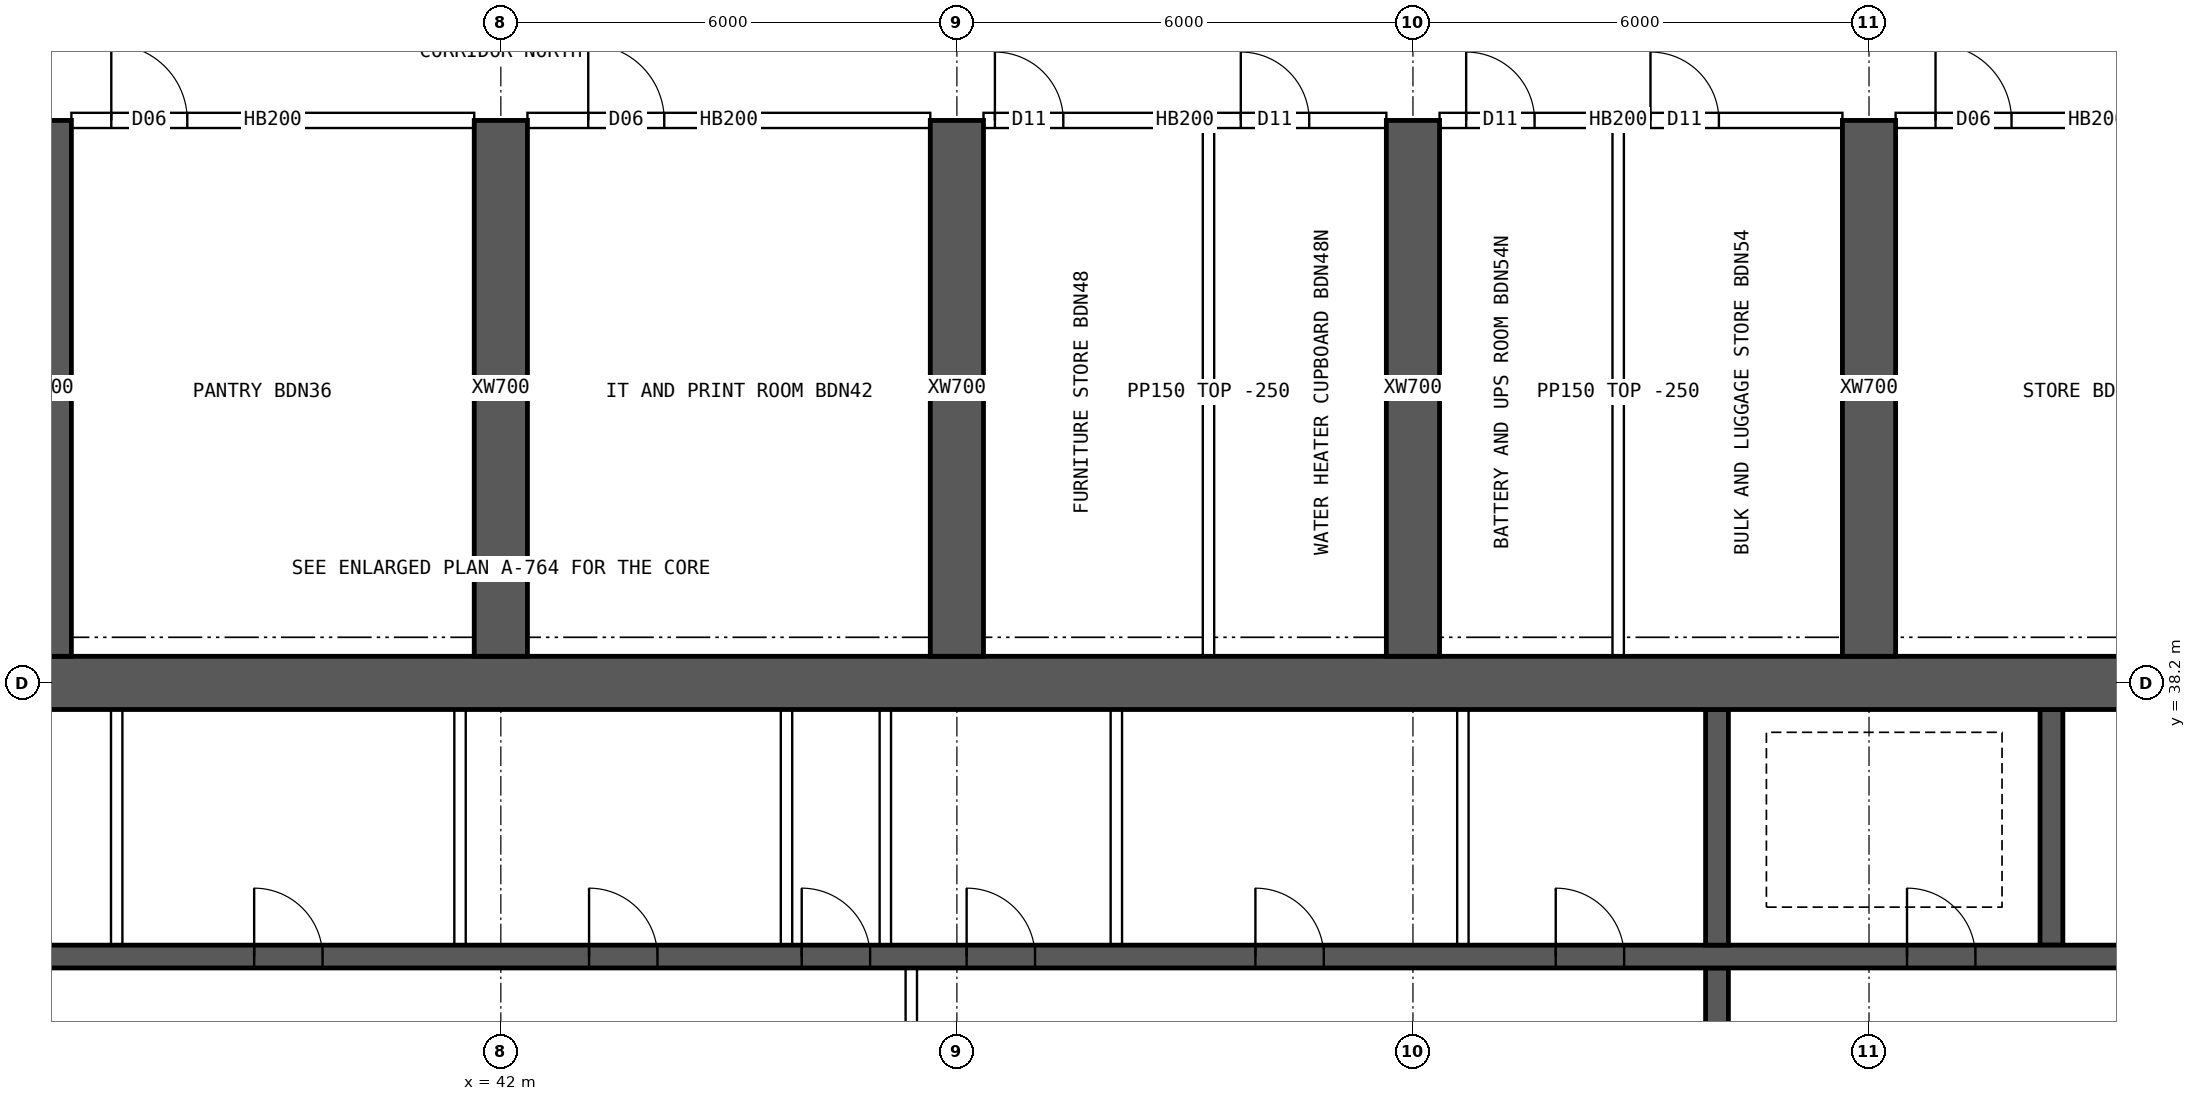
"""IFC4 building model, lengths in metres.
Left out: names, types, materials, properties, quantities, classifications, styles, units other than length and angle.
Written with IfcOpenShell. Run it as: python <this file> out.ifc"""

import sys

from ifc_helpers import new_model, si_unit, direction, frame, frame_2d, origin, place, context, subcontext, project, spatial, rectangle, extrude, element, fill, save


model = new_model("IFC4")
c1 = context("Model", 3, precision=1e-05, world=origin(), true_north=direction((0.0, 1.0)))
c2 = subcontext(c1, "Body", "Model", "MODEL_VIEW")
j1 = project(units=[si_unit("LENGTHUNIT", "METRE"), si_unit("PLANEANGLEUNIT", "RADIAN")], contexts=[c1])
p1 = place(None, origin())
s1 = spatial("IfcSite", under=j1, at=p1, CompositionType="ELEMENT")
p2 = place(p1, origin())
s2 = spatial("IfcBuilding", under=s1, at=p2, CompositionType="ELEMENT")
p3 = place(p2, frame((0.0, 0.0, 246.55)))
s3 = spatial("IfcBuildingStorey", under=s2, at=p3, CompositionType="ELEMENT", Elevation=246.55)
p4 = place(p3, frame((18.0, 38.2, 0.0), z_axis=(0.0, 0.0, 1.0), x_axis=(1.0, 0.0, 0.0)))
e1 = element("IfcWall", 1, at=p4, inside=s3, PredefinedType="SHEAR", context=c2, shape_type="SweptSolid", body=[
    extrude(rectangle(XDim=48.0, YDim=0.7, at=frame_2d((24.0, 0.0))), origin(), (0.0, 0.0, 1.0), 3.75),
])
p5 = place(p3, frame((18.35, 34.6, 0.0), z_axis=(0.0, 0.0, 1.0), x_axis=(1.0, 0.0, 0.0)))
e2 = element("IfcWall", 2, at=p5, inside=s3, PredefinedType="SHEAR", context=c2, shape_type="SweptSolid", body=[
    extrude(rectangle(XDim=47.3, YDim=0.3, at=frame_2d((23.65, 0.0))), origin(), (0.0, 0.0, 1.0), 3.75),
])
p6 = place(p5, frame((0.9, 0.0, 0.0)))
e3 = element("IfcOpeningElement", 3, at=p6, cuts=e2, PredefinedType="OPENING", context=c2, shape_type="SweptSolid", body=[
    extrude(rectangle(XDim=1.1, YDim=2.1, at=frame_2d((0.55, 1.05))), frame((0.0, 0.16, 0.0), z_axis=(0.0, -1.0, 0.0), x_axis=(1.0, 0.0, 0.0)), (0.0, 0.0, 1.0), 0.32),
])
p7 = place(p5, frame((45.3, 0.0, 0.0)))
e4 = element("IfcOpeningElement", 4, at=p7, cuts=e2, PredefinedType="OPENING", context=c2, shape_type="SweptSolid", body=[
    extrude(rectangle(XDim=1.1, YDim=2.1, at=frame_2d((0.55, 1.05))), frame((0.0, 0.16, 0.0), z_axis=(0.0, -1.0, 0.0), x_axis=(1.0, 0.0, 0.0)), (0.0, 0.0, 1.0), 0.32),
])
p8 = place(p5, frame((4.25, 0.0, 0.0)))
e5 = element("IfcOpeningElement", 5, at=p8, cuts=e2, PredefinedType="OPENING", context=c2, shape_type="SweptSolid", body=[
    extrude(rectangle(XDim=0.9, YDim=2.1, at=frame_2d((0.45, 1.05))), frame((0.0, 0.16, 0.0), z_axis=(0.0, -1.0, 0.0), x_axis=(1.0, 0.0, 0.0)), (0.0, 0.0, 1.0), 0.32),
])
p9 = place(p5, frame((42.15, 0.0, 0.0)))
e6 = element("IfcOpeningElement", 6, at=p9, cuts=e2, PredefinedType="OPENING", context=c2, shape_type="SweptSolid", body=[
    extrude(rectangle(XDim=0.9, YDim=2.1, at=frame_2d((0.45, 1.05))), frame((0.0, 0.16, 0.0), z_axis=(0.0, -1.0, 0.0), x_axis=(1.0, 0.0, 0.0)), (0.0, 0.0, 1.0), 0.32),
])
p10 = place(p5, frame((9.025, 0.0, 0.0)))
e7 = element("IfcOpeningElement", 7, at=p10, cuts=e2, PredefinedType="OPENING", context=c2, shape_type="SweptSolid", body=[
    extrude(rectangle(XDim=0.9, YDim=2.1, at=frame_2d((0.45, 1.05))), frame((0.0, 0.16, 0.0), z_axis=(0.0, -1.0, 0.0), x_axis=(1.0, 0.0, 0.0)), (0.0, 0.0, 1.0), 0.32),
])
p11 = place(p5, frame((12.999, 0.0, 0.0)))
e8 = element("IfcOpeningElement", 8, at=p11, cuts=e2, PredefinedType="OPENING", context=c2, shape_type="SweptSolid", body=[
    extrude(rectangle(XDim=0.9, YDim=2.1, at=frame_2d((0.45, 1.05))), frame((0.0, 0.16, 0.0), z_axis=(0.0, -1.0, 0.0), x_axis=(1.0, 0.0, 0.0)), (0.0, 0.0, 1.0), 0.32),
])
p12 = place(p5, frame((16.646, 0.0, 0.0)))
e9 = element("IfcOpeningElement", 9, at=p12, cuts=e2, PredefinedType="OPENING", context=c2, shape_type="SweptSolid", body=[
    extrude(rectangle(XDim=0.9, YDim=2.1, at=frame_2d((0.45, 1.05))), frame((0.0, 0.16, 0.0), z_axis=(0.0, -1.0, 0.0), x_axis=(1.0, 0.0, 0.0)), (0.0, 0.0, 1.0), 0.32),
])
p13 = place(p5, frame((20.405, 0.0, 0.0)))
e10 = element("IfcOpeningElement", 10, at=p13, cuts=e2, PredefinedType="OPENING", context=c2, shape_type="SweptSolid", body=[
    extrude(rectangle(XDim=0.9, YDim=2.1, at=frame_2d((0.45, 1.05))), frame((0.0, 0.16, 0.0), z_axis=(0.0, -1.0, 0.0), x_axis=(1.0, 0.0, 0.0)), (0.0, 0.0, 1.0), 0.32),
])
p14 = place(p5, frame((24.811, 0.0, 0.0)))
e11 = element("IfcOpeningElement", 11, at=p14, cuts=e2, PredefinedType="OPENING", context=c2, shape_type="SweptSolid", body=[
    extrude(rectangle(XDim=0.9, YDim=2.1, at=frame_2d((0.45, 1.05))), frame((0.0, 0.16, 0.0), z_axis=(0.0, -1.0, 0.0), x_axis=(1.0, 0.0, 0.0)), (0.0, 0.0, 1.0), 0.32),
])
p15 = place(p5, frame((27.608, 0.0, 0.0)))
e12 = element("IfcOpeningElement", 12, at=p15, cuts=e2, PredefinedType="OPENING", context=c2, shape_type="SweptSolid", body=[
    extrude(rectangle(XDim=0.9, YDim=2.1, at=frame_2d((0.45, 1.05))), frame((0.0, 0.16, 0.0), z_axis=(0.0, -1.0, 0.0), x_axis=(1.0, 0.0, 0.0)), (0.0, 0.0, 1.0), 0.32),
])
p16 = place(p5, frame((29.778, 0.0, 0.0)))
e13 = element("IfcOpeningElement", 13, at=p16, cuts=e2, PredefinedType="OPENING", context=c2, shape_type="SweptSolid", body=[
    extrude(rectangle(XDim=0.9, YDim=2.1, at=frame_2d((0.45, 1.05))), frame((0.0, 0.16, 0.0), z_axis=(0.0, -1.0, 0.0), x_axis=(1.0, 0.0, 0.0)), (0.0, 0.0, 1.0), 0.32),
])
p17 = place(p5, frame((33.577, 0.0, 0.0)))
e14 = element("IfcOpeningElement", 14, at=p17, cuts=e2, PredefinedType="OPENING", context=c2, shape_type="SweptSolid", body=[
    extrude(rectangle(XDim=0.9, YDim=2.1, at=frame_2d((0.45, 1.05))), frame((0.0, 0.16, 0.0), z_axis=(0.0, -1.0, 0.0), x_axis=(1.0, 0.0, 0.0)), (0.0, 0.0, 1.0), 0.32),
])
p18 = place(p5, frame((37.528, 0.0, 0.0)))
e15 = element("IfcOpeningElement", 15, at=p18, cuts=e2, PredefinedType="OPENING", context=c2, shape_type="SweptSolid", body=[
    extrude(rectangle(XDim=0.9, YDim=2.1, at=frame_2d((0.45, 1.05))), frame((0.0, 0.16, 0.0), z_axis=(0.0, -1.0, 0.0), x_axis=(1.0, 0.0, 0.0)), (0.0, 0.0, 1.0), 0.32),
])
p19 = place(p3, frame((58.0, 30.55, 0.0), z_axis=(0.0, 0.0, 1.0), x_axis=(0.0, 1.0, 0.0)))
e16 = element("IfcWall", 16, at=p19, inside=s3, PredefinedType="SHEAR", context=c2, shape_type="SweptSolid", body=[
    extrude(rectangle(XDim=3.9, YDim=0.3, at=frame_2d((1.95, 0.0))), origin(), (0.0, 0.0, 1.0), 3.75),
])
p20 = place(p19, frame((1.4, 0.0, 0.0)))
e17 = element("IfcOpeningElement", 17, at=p20, cuts=e16, PredefinedType="OPENING", context=c2, shape_type="SweptSolid", body=[
    extrude(rectangle(XDim=1.2, YDim=2.1, at=frame_2d((0.6, 1.05))), frame((0.0, 0.16, 0.0), z_axis=(0.0, -1.0, 0.0), x_axis=(1.0, 0.0, 0.0)), (0.0, 0.0, 1.0), 0.32),
])
for number, where, z_axis, x_axis in (
    (18, (62.4, 34.75, 0.0), (0.0, 0.0, 1.0), (0.0, 1.0, 0.0)),
    (19, (58.0, 34.75, 0.0), (0.0, 0.0, 1.0), (0.0, 1.0, 0.0)),
):
    element("IfcWall", number, at=place(p3, frame(where, z_axis=z_axis, x_axis=x_axis)), inside=s3, PredefinedType="SHEAR", context=c2, shape_type="SweptSolid", body=[
        extrude(rectangle(XDim=3.1, YDim=0.3, at=frame_2d((1.55, 0.0))), origin(), (0.0, 0.0, 1.0), 3.75),
    ])
for number, where, z_axis, x_axis in (
    (20, (36.0, 38.55, 0.0), (0.0, 0.0, 1.0), (0.0, 1.0, 0.0)),
    (21, (42.0, 38.55, 0.0), (0.0, 0.0, 1.0), (0.0, 1.0, 0.0)),
    (22, (48.0, 38.55, 0.0), (0.0, 0.0, 1.0), (0.0, 1.0, 0.0)),
    (23, (54.0, 38.55, 0.0), (0.0, 0.0, 1.0), (0.0, 1.0, 0.0)),
    (24, (60.0, 38.55, 0.0), (0.0, 0.0, 1.0), (0.0, 1.0, 0.0)),
):
    element("IfcWall", number, at=place(p3, frame(where, z_axis=z_axis, x_axis=x_axis)), inside=s3, PredefinedType="SHEAR", context=c2, shape_type="SweptSolid", body=[
        extrude(rectangle(XDim=7.05, YDim=0.7, at=frame_2d((3.525, 0.0))), origin(), (0.0, 0.0, 1.0), 3.75),
    ])
p21 = place(p3, frame((47.4, 30.55, 0.0), z_axis=(0.0, 0.0, 1.0), x_axis=(0.0, 1.0, 0.0)))
e25 = element("IfcWall", 25, at=p21, inside=s3, PredefinedType="SOLIDWALL", context=c2, shape_type="SweptSolid", body=[
    extrude(rectangle(XDim=3.9, YDim=0.15, at=frame_2d((1.95, 0.0))), origin(), (0.0, 0.0, 1.0), 3.5),
])
p22 = place(p21, frame((1.15, 0.0, 0.0)))
e26 = element("IfcOpeningElement", 26, at=p22, cuts=e25, PredefinedType="OPENING", context=c2, shape_type="SweptSolid", body=[
    extrude(rectangle(XDim=1.6, YDim=2.1, at=frame_2d((0.8, 1.05))), frame((0.0, 0.085, 0.0), z_axis=(0.0, -1.0, 0.0), x_axis=(1.0, 0.0, 0.0)), (0.0, 0.0, 1.0), 0.17),
])
for number, where, z_axis, x_axis in (
    (27, (36.946, 34.75, 0.0), (0.0, 0.0, 1.0), (0.0, 1.0, 0.0)),
    (28, (41.463, 34.75, 0.0), (0.0, 0.0, 1.0), (0.0, 1.0, 0.0)),
    (29, (45.758, 34.75, 0.0), (0.0, 0.0, 1.0), (0.0, 1.0, 0.0)),
    (30, (47.058, 34.75, 0.0), (0.0, 0.0, 1.0), (0.0, 1.0, 0.0)),
    (31, (50.098, 34.75, 0.0), (0.0, 0.0, 1.0), (0.0, 1.0, 0.0)),
    (32, (54.657, 34.75, 0.0), (0.0, 0.0, 1.0), (0.0, 1.0, 0.0)),
):
    element("IfcWall", number, at=place(p3, frame(where, z_axis=z_axis, x_axis=x_axis)), inside=s3, PredefinedType="SOLIDWALL", context=c2, shape_type="SweptSolid", body=[
        extrude(rectangle(XDim=3.1, YDim=0.15, at=frame_2d((1.55, 0.0))), origin(), (0.0, 0.0, 1.0), 3.5),
    ])
p23 = place(p3, frame((36.35, 45.6, 0.0), z_axis=(0.0, 0.0, 1.0), x_axis=(1.0, 0.0, 0.0)))
e33 = element("IfcWall", 33, at=p23, inside=s3, PredefinedType="SOLIDWALL", context=c2, shape_type="SweptSolid", body=[
    extrude(rectangle(XDim=5.3, YDim=0.2, at=frame_2d((2.65, 0.0))), origin(), (0.0, 0.0, 1.0), 3.5),
])
p24 = place(p23, frame((0.525, 0.0, 0.0)))
e34 = element("IfcOpeningElement", 34, at=p24, cuts=e33, PredefinedType="OPENING", context=c2, shape_type="SweptSolid", body=[
    extrude(rectangle(XDim=1.0, YDim=2.1, at=frame_2d((0.5, 1.05))), frame((0.0, 0.11, 0.0), z_axis=(0.0, -1.0, 0.0), x_axis=(1.0, 0.0, 0.0)), (0.0, 0.0, 1.0), 0.22),
])
p25 = place(p3, frame((42.35, 45.6, 0.0), z_axis=(0.0, 0.0, 1.0), x_axis=(1.0, 0.0, 0.0)))
e35 = element("IfcWall", 35, at=p25, inside=s3, PredefinedType="SOLIDWALL", context=c2, shape_type="SweptSolid", body=[
    extrude(rectangle(XDim=5.3, YDim=0.2, at=frame_2d((2.65, 0.0))), origin(), (0.0, 0.0, 1.0), 3.5),
])
p26 = place(p25, frame((0.8, 0.0, 0.0)))
e36 = element("IfcOpeningElement", 36, at=p26, cuts=e35, PredefinedType="OPENING", context=c2, shape_type="SweptSolid", body=[
    extrude(rectangle(XDim=1.0, YDim=2.1, at=frame_2d((0.5, 1.05))), frame((0.0, 0.11, 0.0), z_axis=(0.0, -1.0, 0.0), x_axis=(1.0, 0.0, 0.0)), (0.0, 0.0, 1.0), 0.22),
])
p27 = place(p3, frame((48.35, 45.6, 0.0), z_axis=(0.0, 0.0, 1.0), x_axis=(1.0, 0.0, 0.0)))
e37 = element("IfcWall", 37, at=p27, inside=s3, PredefinedType="SOLIDWALL", context=c2, shape_type="SweptSolid", body=[
    extrude(rectangle(XDim=5.3, YDim=0.2, at=frame_2d((2.65, 0.0))), origin(), (0.0, 0.0, 1.0), 3.5),
])
p28 = place(p27, frame((0.15, 0.0, 0.0)))
e38 = element("IfcOpeningElement", 38, at=p28, cuts=e37, PredefinedType="OPENING", context=c2, shape_type="SweptSolid", body=[
    extrude(rectangle(XDim=0.9, YDim=2.1, at=frame_2d((0.45, 1.05))), frame((0.0, 0.11, 0.0), z_axis=(0.0, -1.0, 0.0), x_axis=(1.0, 0.0, 0.0)), (0.0, 0.0, 1.0), 0.22),
])
p29 = place(p27, frame((3.385, 0.0, 0.0)))
e39 = element("IfcOpeningElement", 39, at=p29, cuts=e37, PredefinedType="OPENING", context=c2, shape_type="SweptSolid", body=[
    extrude(rectangle(XDim=0.9, YDim=2.1, at=frame_2d((0.45, 1.05))), frame((0.0, 0.11, 0.0), z_axis=(0.0, -1.0, 0.0), x_axis=(1.0, 0.0, 0.0)), (0.0, 0.0, 1.0), 0.22),
])
p30 = place(p3, frame((54.35, 45.6, 0.0), z_axis=(0.0, 0.0, 1.0), x_axis=(1.0, 0.0, 0.0)))
e40 = element("IfcWall", 40, at=p30, inside=s3, PredefinedType="SOLIDWALL", context=c2, shape_type="SweptSolid", body=[
    extrude(rectangle(XDim=5.3, YDim=0.2, at=frame_2d((2.65, 0.0))), origin(), (0.0, 0.0, 1.0), 3.5),
])
p31 = place(p30, frame((0.35, 0.0, 0.0)))
e41 = element("IfcOpeningElement", 41, at=p31, cuts=e40, PredefinedType="OPENING", context=c2, shape_type="SweptSolid", body=[
    extrude(rectangle(XDim=0.9, YDim=2.1, at=frame_2d((0.45, 1.05))), frame((0.0, 0.11, 0.0), z_axis=(0.0, -1.0, 0.0), x_axis=(1.0, 0.0, 0.0)), (0.0, 0.0, 1.0), 0.22),
])
p32 = place(p30, frame((2.775, 0.0, 0.0)))
e42 = element("IfcOpeningElement", 42, at=p32, cuts=e40, PredefinedType="OPENING", context=c2, shape_type="SweptSolid", body=[
    extrude(rectangle(XDim=0.9, YDim=2.1, at=frame_2d((0.45, 1.05))), frame((0.0, 0.11, 0.0), z_axis=(0.0, -1.0, 0.0), x_axis=(1.0, 0.0, 0.0)), (0.0, 0.0, 1.0), 0.22),
])
p33 = place(p3, frame((60.35, 45.6, 0.0), z_axis=(0.0, 0.0, 1.0), x_axis=(1.0, 0.0, 0.0)))
e43 = element("IfcWall", 43, at=p33, inside=s3, PredefinedType="SOLIDWALL", context=c2, shape_type="SweptSolid", body=[
    extrude(rectangle(XDim=5.3, YDim=0.2, at=frame_2d((2.65, 0.0))), origin(), (0.0, 0.0, 1.0), 3.5),
])
p34 = place(p33, frame((0.525, 0.0, 0.0)))
e44 = element("IfcOpeningElement", 44, at=p34, cuts=e43, PredefinedType="OPENING", context=c2, shape_type="SweptSolid", body=[
    extrude(rectangle(XDim=1.0, YDim=2.1, at=frame_2d((0.5, 1.05))), frame((0.0, 0.11, 0.0), z_axis=(0.0, -1.0, 0.0), x_axis=(1.0, 0.0, 0.0)), (0.0, 0.0, 1.0), 0.22),
])
for number, where, z_axis, x_axis in (
    (45, (51.31, 38.55, 0.0), (0.0, 0.0, 1.0), (0.0, 1.0, 0.0)),
    (46, (56.7, 38.55, 0.0), (0.0, 0.0, 1.0), (0.0, 1.0, 0.0)),
):
    element("IfcWall", number, at=place(p3, frame(where, z_axis=z_axis, x_axis=x_axis)), inside=s3, PredefinedType="PARTITIONING", context=c2, shape_type="SweptSolid", body=[
        extrude(rectangle(XDim=6.95, YDim=0.15, at=frame_2d((3.475, 0.0))), origin(), (0.0, 0.0, 1.0), 3.5),
    ])
p35 = place(p9, origin())
e47 = element("IfcDoor", 47, at=p35, inside=s3, OperationType="SINGLE_SWING_LEFT", PredefinedType="DOOR", context=c2, shape_type="SweptSolid", body=[
    extrude(rectangle(XDim=0.9, YDim=2.1, at=frame_2d((0.45, 1.05))), frame((0.0, 0.025, 0.0), z_axis=(0.0, -1.0, 0.0), x_axis=(1.0, 0.0, 0.0)), (0.0, 0.0, 1.0), 0.05),
])
fill(e6, e47)
p36 = place(p13, origin())
e48 = element("IfcDoor", 48, at=p36, inside=s3, OperationType="SINGLE_SWING_LEFT", PredefinedType="DOOR", context=c2, shape_type="SweptSolid", body=[
    extrude(rectangle(XDim=0.9, YDim=2.1, at=frame_2d((0.45, 1.05))), frame((0.0, 0.025, 0.0), z_axis=(0.0, -1.0, 0.0), x_axis=(1.0, 0.0, 0.0)), (0.0, 0.0, 1.0), 0.05),
])
fill(e10, e48)
p37 = place(p14, origin())
e49 = element("IfcDoor", 49, at=p37, inside=s3, OperationType="SINGLE_SWING_LEFT", PredefinedType="DOOR", context=c2, shape_type="SweptSolid", body=[
    extrude(rectangle(XDim=0.9, YDim=2.1, at=frame_2d((0.45, 1.05))), frame((0.0, 0.025, 0.0), z_axis=(0.0, -1.0, 0.0), x_axis=(1.0, 0.0, 0.0)), (0.0, 0.0, 1.0), 0.05),
])
fill(e11, e49)
p38 = place(p15, origin())
e50 = element("IfcDoor", 50, at=p38, inside=s3, OperationType="SINGLE_SWING_LEFT", PredefinedType="DOOR", context=c2, shape_type="SweptSolid", body=[
    extrude(rectangle(XDim=0.9, YDim=2.1, at=frame_2d((0.45, 1.05))), frame((0.0, 0.025, 0.0), z_axis=(0.0, -1.0, 0.0), x_axis=(1.0, 0.0, 0.0)), (0.0, 0.0, 1.0), 0.05),
])
fill(e12, e50)
p39 = place(p16, origin())
e51 = element("IfcDoor", 51, at=p39, inside=s3, OperationType="SINGLE_SWING_LEFT", PredefinedType="DOOR", context=c2, shape_type="SweptSolid", body=[
    extrude(rectangle(XDim=0.9, YDim=2.1, at=frame_2d((0.45, 1.05))), frame((0.0, 0.025, 0.0), z_axis=(0.0, -1.0, 0.0), x_axis=(1.0, 0.0, 0.0)), (0.0, 0.0, 1.0), 0.05),
])
fill(e13, e51)
p40 = place(p17, origin())
e52 = element("IfcDoor", 52, at=p40, inside=s3, OperationType="SINGLE_SWING_LEFT", PredefinedType="DOOR", context=c2, shape_type="SweptSolid", body=[
    extrude(rectangle(XDim=0.9, YDim=2.1, at=frame_2d((0.45, 1.05))), frame((0.0, 0.025, 0.0), z_axis=(0.0, -1.0, 0.0), x_axis=(1.0, 0.0, 0.0)), (0.0, 0.0, 1.0), 0.05),
])
fill(e14, e52)
p41 = place(p18, origin())
e53 = element("IfcDoor", 53, at=p41, inside=s3, OperationType="SINGLE_SWING_LEFT", PredefinedType="DOOR", context=c2, shape_type="SweptSolid", body=[
    extrude(rectangle(XDim=0.9, YDim=2.1, at=frame_2d((0.45, 1.05))), frame((0.0, 0.025, 0.0), z_axis=(0.0, -1.0, 0.0), x_axis=(1.0, 0.0, 0.0)), (0.0, 0.0, 1.0), 0.05),
])
fill(e15, e53)
p42 = place(p24, origin())
e54 = element("IfcDoor", 54, at=p42, inside=s3, OperationType="SINGLE_SWING_LEFT", PredefinedType="DOOR", context=c2, shape_type="SweptSolid", body=[
    extrude(rectangle(XDim=1.0, YDim=2.1, at=frame_2d((0.5, 1.05))), frame((0.0, 0.025, 0.0), z_axis=(0.0, -1.0, 0.0), x_axis=(1.0, 0.0, 0.0)), (0.0, 0.0, 1.0), 0.05),
])
fill(e34, e54)
p43 = place(p26, origin())
e55 = element("IfcDoor", 55, at=p43, inside=s3, OperationType="SINGLE_SWING_LEFT", PredefinedType="DOOR", context=c2, shape_type="SweptSolid", body=[
    extrude(rectangle(XDim=1.0, YDim=2.1, at=frame_2d((0.5, 1.05))), frame((0.0, 0.025, 0.0), z_axis=(0.0, -1.0, 0.0), x_axis=(1.0, 0.0, 0.0)), (0.0, 0.0, 1.0), 0.05),
])
fill(e36, e55)
p44 = place(p28, origin())
e56 = element("IfcDoor", 56, at=p44, inside=s3, OperationType="SINGLE_SWING_LEFT", PredefinedType="DOOR", context=c2, shape_type="SweptSolid", body=[
    extrude(rectangle(XDim=0.9, YDim=2.1, at=frame_2d((0.45, 1.05))), frame((0.0, 0.025, 0.0), z_axis=(0.0, -1.0, 0.0), x_axis=(1.0, 0.0, 0.0)), (0.0, 0.0, 1.0), 0.05),
])
fill(e38, e56)
p45 = place(p29, origin())
e57 = element("IfcDoor", 57, at=p45, inside=s3, OperationType="SINGLE_SWING_LEFT", PredefinedType="DOOR", context=c2, shape_type="SweptSolid", body=[
    extrude(rectangle(XDim=0.9, YDim=2.1, at=frame_2d((0.45, 1.05))), frame((0.0, 0.025, 0.0), z_axis=(0.0, -1.0, 0.0), x_axis=(1.0, 0.0, 0.0)), (0.0, 0.0, 1.0), 0.05),
])
fill(e39, e57)
p46 = place(p31, origin())
e58 = element("IfcDoor", 58, at=p46, inside=s3, OperationType="SINGLE_SWING_LEFT", PredefinedType="DOOR", context=c2, shape_type="SweptSolid", body=[
    extrude(rectangle(XDim=0.9, YDim=2.1, at=frame_2d((0.45, 1.05))), frame((0.0, 0.025, 0.0), z_axis=(0.0, -1.0, 0.0), x_axis=(1.0, 0.0, 0.0)), (0.0, 0.0, 1.0), 0.05),
])
fill(e41, e58)
p47 = place(p32, origin())
e59 = element("IfcDoor", 59, at=p47, inside=s3, OperationType="SINGLE_SWING_LEFT", PredefinedType="DOOR", context=c2, shape_type="SweptSolid", body=[
    extrude(rectangle(XDim=0.9, YDim=2.1, at=frame_2d((0.45, 1.05))), frame((0.0, 0.025, 0.0), z_axis=(0.0, -1.0, 0.0), x_axis=(1.0, 0.0, 0.0)), (0.0, 0.0, 1.0), 0.05),
])
fill(e42, e59)
p48 = place(p34, origin())
e60 = element("IfcDoor", 60, at=p48, inside=s3, OperationType="SINGLE_SWING_LEFT", PredefinedType="DOOR", context=c2, shape_type="SweptSolid", body=[
    extrude(rectangle(XDim=1.0, YDim=2.1, at=frame_2d((0.5, 1.05))), frame((0.0, 0.025, 0.0), z_axis=(0.0, -1.0, 0.0), x_axis=(1.0, 0.0, 0.0)), (0.0, 0.0, 1.0), 0.05),
])
fill(e44, e60)
save(model, sys.argv[1])
